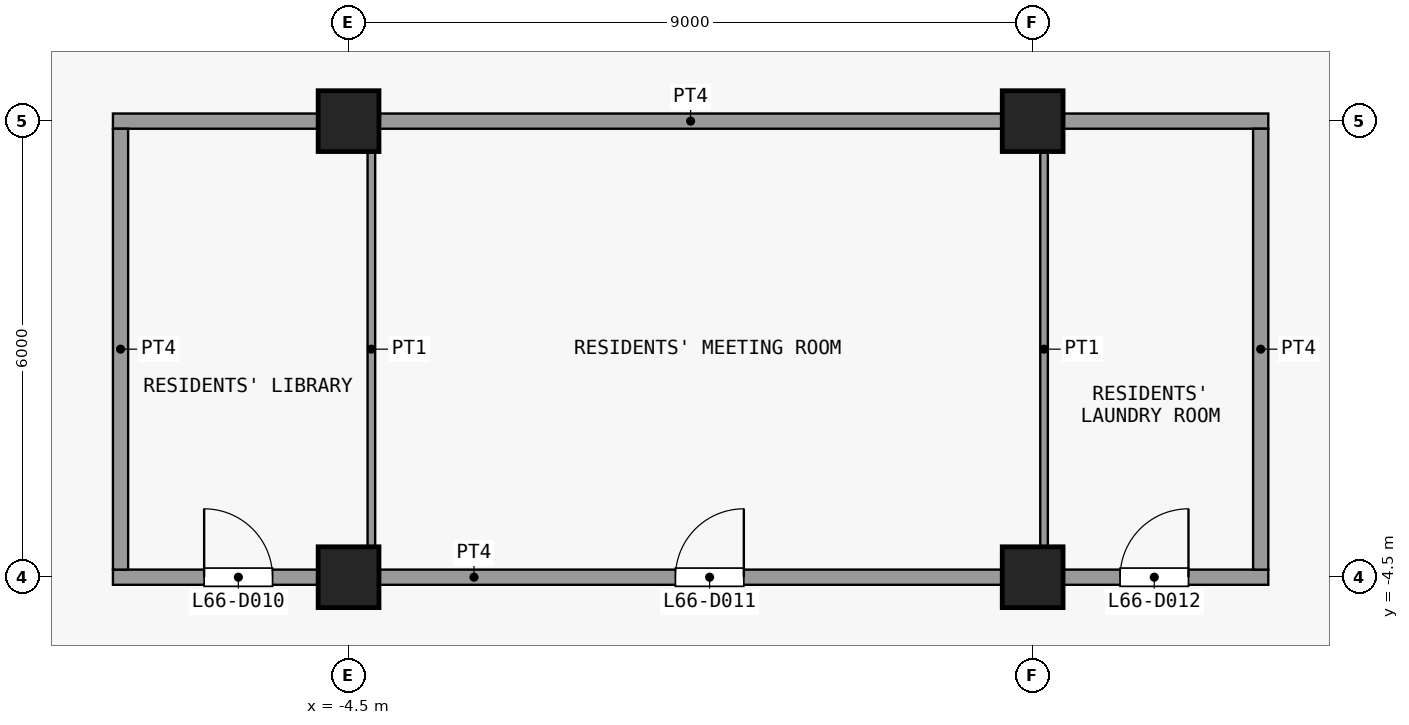
"""IFC4 building model, lengths in metres.
Left out: names, types, materials, properties, quantities, classifications, styles, units other than length and angle.
Written with IfcOpenShell. Run it as: python <this file> out.ifc"""

import sys

from ifc_helpers import new_model, si_unit, direction, frame, frame_2d, origin, origin_2d, place, context, subcontext, project, spatial, rectangle, extrude, element, fill, save


model = new_model("IFC4")
c1 = context("Model", 3, precision=1e-05, world=origin(), true_north=direction((0.0, 1.0)))
c2 = subcontext(c1, "Body", "Model", "MODEL_VIEW")
j1 = project(units=[si_unit("LENGTHUNIT", "METRE"), si_unit("PLANEANGLEUNIT", "RADIAN")], contexts=[c1])
p1 = place(None, origin())
s1 = spatial("IfcSite", under=j1, at=p1, CompositionType="ELEMENT")
p2 = place(p1, origin())
s2 = spatial("IfcBuilding", under=s1, at=p2, CompositionType="ELEMENT")
p3 = place(p2, frame((0.0, 0.0, 262.7)))
s3 = spatial("IfcBuildingStorey", under=s2, at=p3, CompositionType="ELEMENT", Elevation=262.7)
for number, where, z_axis, x_axis in (
    (1, (-4.5, -4.5, 0.0), (0.0, 0.0, 1.0), (1.0, 0.0, 0.0)),
    (2, (-4.5, 1.5, 0.0), (0.0, 0.0, 1.0), (1.0, 0.0, 0.0)),
    (3, (4.5, -4.5, 0.0), (0.0, 0.0, 1.0), (1.0, 0.0, 0.0)),
    (4, (4.5, 1.5, 0.0), (0.0, 0.0, 1.0), (1.0, 0.0, 0.0)),
):
    element("IfcColumn", number, at=place(p3, frame(where, z_axis=z_axis, x_axis=x_axis)), inside=s3, PredefinedType="COLUMN", context=c2, shape_type="SweptSolid", body=[
        extrude(rectangle(XDim=0.8, YDim=0.8, at=origin_2d()), origin(), (0.0, 0.0, 1.0), 3.6),
    ])
p4 = place(p3, frame((-7.6, -4.5, 0.0), z_axis=(0.0, 0.0, 1.0), x_axis=(1.0, 0.0, 0.0)))
e5 = element("IfcWall", 5, at=p4, inside=s3, PredefinedType="PARTITIONING", context=c2, shape_type="SweptSolid", body=[
    extrude(rectangle(XDim=15.2, YDim=0.2, at=frame_2d((7.6, 0.0))), origin(), (0.0, 0.0, 1.0), 3.3),
])
p5 = place(p4, frame((1.2, 0.0, 0.0)))
e6 = element("IfcOpeningElement", 6, at=p5, cuts=e5, PredefinedType="OPENING", context=c2, shape_type="SweptSolid", body=[
    extrude(rectangle(XDim=0.9, YDim=2.1, at=frame_2d((0.45, 1.05))), frame((0.0, 0.11, 0.0), z_axis=(0.0, -1.0, 0.0), x_axis=(1.0, 0.0, 0.0)), (0.0, 0.0, 1.0), 0.22),
])
p6 = place(p4, frame((7.4, 0.0, 0.0)))
e7 = element("IfcOpeningElement", 7, at=p6, cuts=e5, PredefinedType="OPENING", context=c2, shape_type="SweptSolid", body=[
    extrude(rectangle(XDim=0.9, YDim=2.1, at=frame_2d((0.45, 1.05))), frame((0.0, 0.11, 0.0), z_axis=(0.0, -1.0, 0.0), x_axis=(1.0, 0.0, 0.0)), (0.0, 0.0, 1.0), 0.22),
])
p7 = place(p4, frame((13.25, 0.0, 0.0)))
e8 = element("IfcOpeningElement", 8, at=p7, cuts=e5, PredefinedType="OPENING", context=c2, shape_type="SweptSolid", body=[
    extrude(rectangle(XDim=0.9, YDim=2.1, at=frame_2d((0.45, 1.05))), frame((0.0, 0.11, 0.0), z_axis=(0.0, -1.0, 0.0), x_axis=(1.0, 0.0, 0.0)), (0.0, 0.0, 1.0), 0.22),
])
p8 = place(p3, frame((-7.6, 1.5, 0.0), z_axis=(0.0, 0.0, 1.0), x_axis=(1.0, 0.0, 0.0)))
e9 = element("IfcWall", 9, at=p8, inside=s3, PredefinedType="PARTITIONING", context=c2, shape_type="SweptSolid", body=[
    extrude(rectangle(XDim=15.2, YDim=0.2, at=frame_2d((7.6, 0.0))), origin(), (0.0, 0.0, 1.0), 3.3),
])
p9 = place(p3, frame((-7.5, -4.4, 0.0), z_axis=(0.0, 0.0, 1.0), x_axis=(0.0, 1.0, 0.0)))
e10 = element("IfcWall", 10, at=p9, inside=s3, PredefinedType="PARTITIONING", context=c2, shape_type="SweptSolid", body=[
    extrude(rectangle(XDim=5.8, YDim=0.2, at=frame_2d((2.9, 0.0))), origin(), (0.0, 0.0, 1.0), 3.3),
])
for number, where, z_axis, x_axis in (
    (11, (-4.2, -4.4, 0.0), (0.0, 0.0, 1.0), (0.0, 1.0, 0.0)),
    (12, (4.65, -4.4, 0.0), (0.0, 0.0, 1.0), (0.0, 1.0, 0.0)),
):
    element("IfcWall", number, at=place(p3, frame(where, z_axis=z_axis, x_axis=x_axis)), inside=s3, PredefinedType="PARTITIONING", context=c2, shape_type="SweptSolid", body=[
        extrude(rectangle(XDim=5.8, YDim=0.1, at=frame_2d((2.9, 0.0))), origin(), (0.0, 0.0, 1.0), 3.3),
    ])
p10 = place(p3, frame((7.5, -4.4, 0.0), z_axis=(0.0, 0.0, 1.0), x_axis=(0.0, 1.0, 0.0)))
e13 = element("IfcWall", 13, at=p10, inside=s3, PredefinedType="PARTITIONING", context=c2, shape_type="SweptSolid", body=[
    extrude(rectangle(XDim=5.8, YDim=0.2, at=frame_2d((2.9, 0.0))), origin(), (0.0, 0.0, 1.0), 3.3),
])
p11 = place(p5, origin())
e14 = element("IfcDoor", 14, at=p11, inside=s3, OperationType="SINGLE_SWING_RIGHT", PredefinedType="DOOR", context=c2, shape_type="SweptSolid", body=[
    extrude(rectangle(XDim=0.9, YDim=2.1, at=frame_2d((0.45, 1.05))), frame((0.0, 0.025, 0.0), z_axis=(0.0, -1.0, 0.0), x_axis=(1.0, 0.0, 0.0)), (0.0, 0.0, 1.0), 0.05),
])
fill(e6, e14)
p12 = place(p6, origin())
e15 = element("IfcDoor", 15, at=p12, inside=s3, OperationType="SINGLE_SWING_LEFT", PredefinedType="DOOR", context=c2, shape_type="SweptSolid", body=[
    extrude(rectangle(XDim=0.9, YDim=2.1, at=frame_2d((0.45, 1.05))), frame((0.0, 0.025, 0.0), z_axis=(0.0, -1.0, 0.0), x_axis=(1.0, 0.0, 0.0)), (0.0, 0.0, 1.0), 0.05),
])
fill(e7, e15)
p13 = place(p7, origin())
e16 = element("IfcDoor", 16, at=p13, inside=s3, OperationType="SINGLE_SWING_LEFT", PredefinedType="DOOR", context=c2, shape_type="SweptSolid", body=[
    extrude(rectangle(XDim=0.9, YDim=2.1, at=frame_2d((0.45, 1.05))), frame((0.0, 0.025, 0.0), z_axis=(0.0, -1.0, 0.0), x_axis=(1.0, 0.0, 0.0)), (0.0, 0.0, 1.0), 0.05),
])
fill(e8, e16)
save(model, sys.argv[1])
